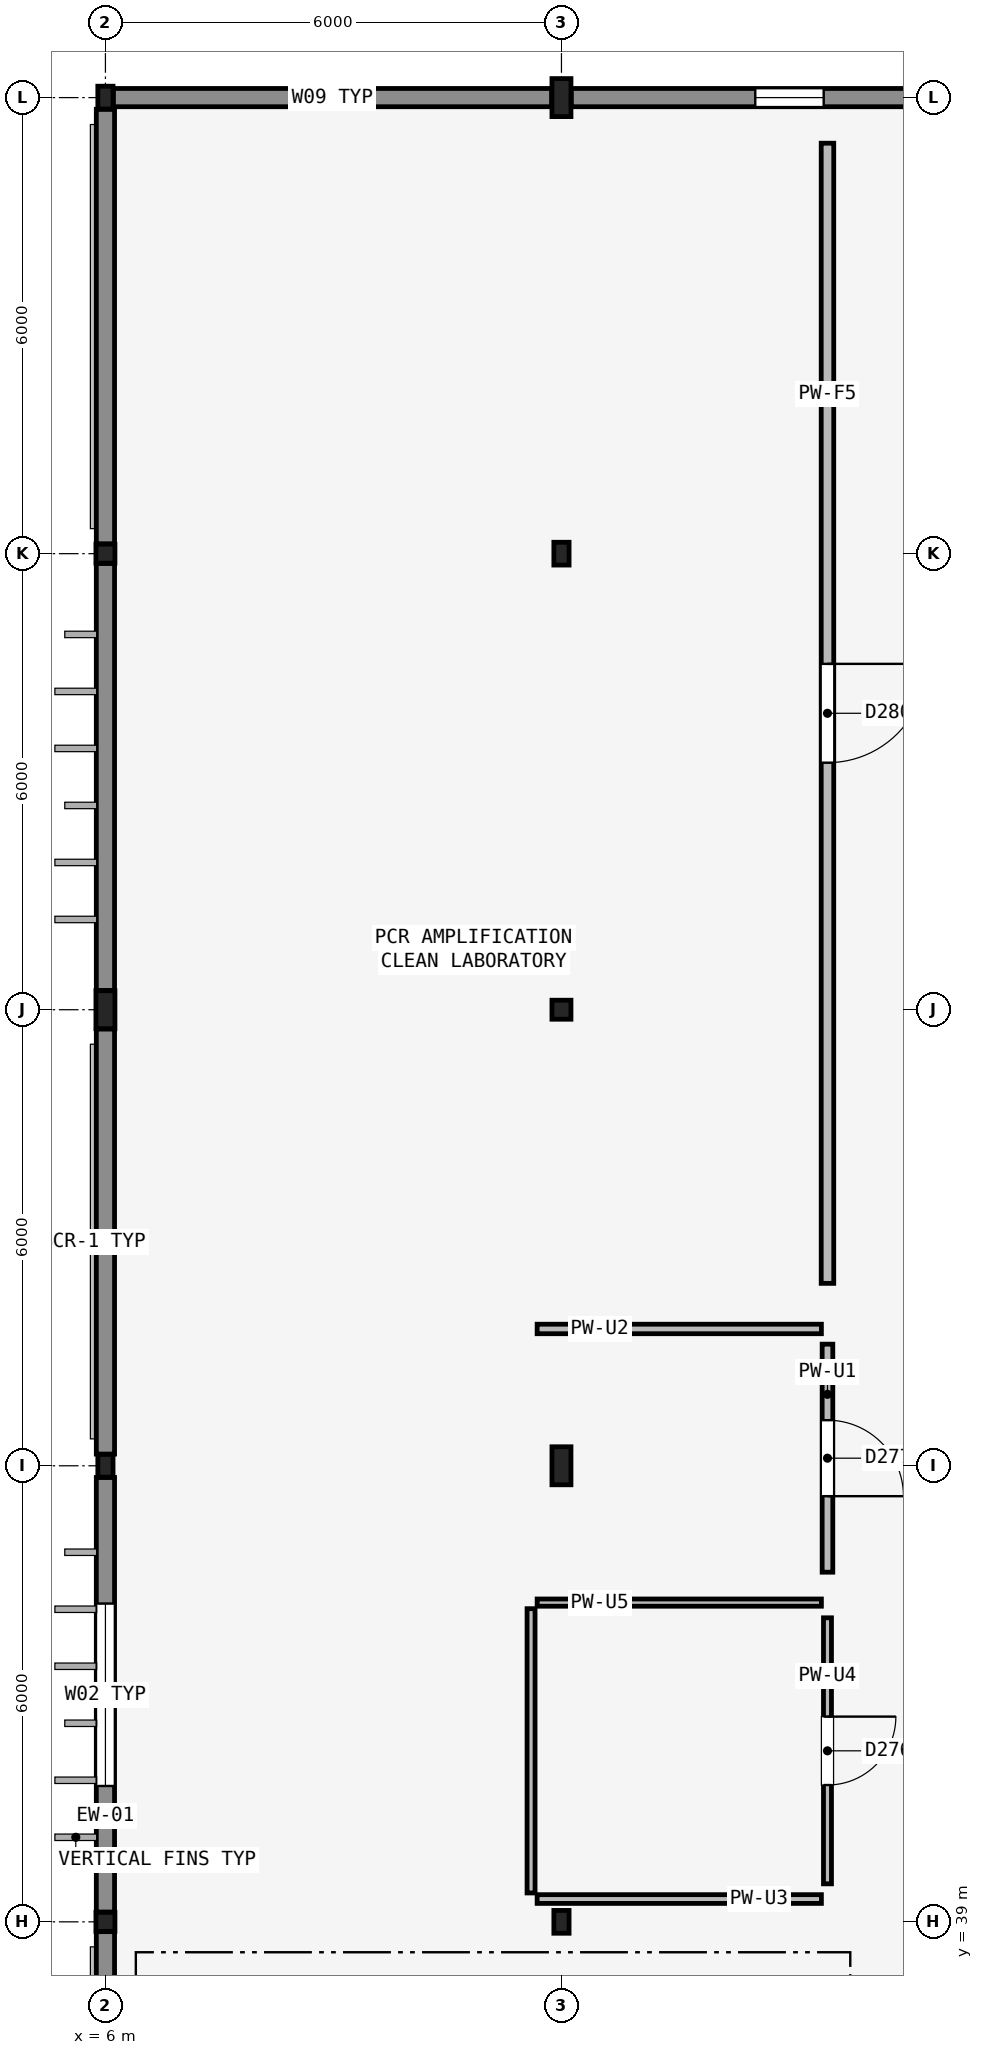
"""IFC4 building model, lengths in metres.
Left out: names, types, materials, properties, quantities, classifications, styles, units other than length and angle.
Written with IfcOpenShell. Run it as: python <this file> out.ifc"""

import sys

from ifc_helpers import new_model, si_unit, direction, frame, frame_2d, origin, origin_2d, place, context, subcontext, project, spatial, rectangle, hollow_rectangle, i_section, extrude, element, fill, save


model = new_model("IFC4")
c1 = context("Model", 3, precision=1e-05, world=origin(), true_north=direction((0.0, 1.0)))
c2 = subcontext(c1, "Body", "Model", "MODEL_VIEW")
j1 = project(units=[si_unit("LENGTHUNIT", "METRE"), si_unit("PLANEANGLEUNIT", "RADIAN")], contexts=[c1])
p1 = place(None, origin())
s1 = spatial("IfcSite", under=j1, at=p1, CompositionType="ELEMENT")
p2 = place(p1, origin())
s2 = spatial("IfcBuilding", under=s1, at=p2, CompositionType="ELEMENT")
p3 = place(p2, frame((0.0, 0.0, 22.2)))
s3 = spatial("IfcBuildingStorey", under=s2, at=p3, CompositionType="ELEMENT", Elevation=22.2)
p4 = place(p3, frame((6.0, 39.0, 0.0), z_axis=(0.0, 0.0, 1.0), x_axis=(1.0, 0.0, 0.0)))
e1 = element("IfcColumn", 1, at=p4, inside=s3, PredefinedType="COLUMN", context=c2, shape_type="SweptSolid", body=[
    extrude(hollow_rectangle(XDim=0.25, YDim=0.25, WallThickness=0.012, InnerFilletRadius=0.012, OuterFilletRadius=0.024, at=origin_2d()), origin(), (0.0, 0.0, 1.0), 3.9),
])
p5 = place(p3, frame((6.0, 45.0, 0.0), z_axis=(0.0, 0.0, 1.0), x_axis=(1.0, 0.0, 0.0)))
e2 = element("IfcColumn", 2, at=p5, inside=s3, PredefinedType="COLUMN", context=c2, shape_type="SweptSolid", body=[
    extrude(hollow_rectangle(XDim=0.2, YDim=0.3, WallThickness=0.012, InnerFilletRadius=0.012, OuterFilletRadius=0.024, at=origin_2d()), origin(), (0.0, 0.0, 1.0), 3.9),
])
p6 = place(p3, frame((6.0, 51.0, 0.0), z_axis=(0.0, 0.0, 1.0), x_axis=(1.0, 0.0, 0.0)))
e3 = element("IfcColumn", 3, at=p6, inside=s3, PredefinedType="COLUMN", context=c2, shape_type="SweptSolid", body=[
    extrude(i_section(OverallWidth=0.25, OverallDepth=0.5, WebThickness=0.01, FlangeThickness=0.015, FilletRadius=0.015, at=origin_2d()), origin(), (0.0, 0.0, 1.0), 3.9),
])
p7 = place(p3, frame((6.0, 57.0, 0.0), z_axis=(0.0, 0.0, 1.0), x_axis=(1.0, 0.0, 0.0)))
e4 = element("IfcColumn", 4, at=p7, inside=s3, PredefinedType="COLUMN", context=c2, shape_type="SweptSolid", body=[
    extrude(hollow_rectangle(XDim=0.25, YDim=0.25, WallThickness=0.012, InnerFilletRadius=0.012, OuterFilletRadius=0.024, at=origin_2d()), origin(), (0.0, 0.0, 1.0), 3.9),
])
for number, where, z_axis, x_axis in (
    (5, (6.0, 63.0, 0.0), (0.0, 0.0, 1.0), (1.0, 0.0, 0.0)),
    (6, (12.0, 39.0, 0.0), (0.0, 0.0, 1.0), (1.0, 0.0, 0.0)),
):
    element("IfcColumn", number, at=place(p3, frame(where, z_axis=z_axis, x_axis=x_axis)), inside=s3, PredefinedType="COLUMN", context=c2, shape_type="SweptSolid", body=[
        extrude(hollow_rectangle(XDim=0.2, YDim=0.3, WallThickness=0.012, InnerFilletRadius=0.012, OuterFilletRadius=0.024, at=origin_2d()), origin(), (0.0, 0.0, 1.0), 3.9),
    ])
p8 = place(p3, frame((12.0, 45.0, 0.0), z_axis=(0.0, 0.0, 1.0), x_axis=(1.0, 0.0, 0.0)))
e7 = element("IfcColumn", 7, at=p8, inside=s3, PredefinedType="COLUMN", context=c2, shape_type="SweptSolid", body=[
    extrude(i_section(OverallWidth=0.25, OverallDepth=0.5, WebThickness=0.01, FlangeThickness=0.015, FilletRadius=0.015, at=origin_2d()), origin(), (0.0, 0.0, 1.0), 3.9),
])
p9 = place(p3, frame((12.0, 51.0, 0.0), z_axis=(0.0, 0.0, 1.0), x_axis=(1.0, 0.0, 0.0)))
e8 = element("IfcColumn", 8, at=p9, inside=s3, PredefinedType="COLUMN", context=c2, shape_type="SweptSolid", body=[
    extrude(hollow_rectangle(XDim=0.25, YDim=0.25, WallThickness=0.012, InnerFilletRadius=0.012, OuterFilletRadius=0.024, at=origin_2d()), origin(), (0.0, 0.0, 1.0), 3.9),
])
p10 = place(p3, frame((12.0, 57.0, 0.0), z_axis=(0.0, 0.0, 1.0), x_axis=(1.0, 0.0, 0.0)))
e9 = element("IfcColumn", 9, at=p10, inside=s3, PredefinedType="COLUMN", context=c2, shape_type="SweptSolid", body=[
    extrude(hollow_rectangle(XDim=0.2, YDim=0.3, WallThickness=0.012, InnerFilletRadius=0.012, OuterFilletRadius=0.024, at=origin_2d()), origin(), (0.0, 0.0, 1.0), 3.9),
])
p11 = place(p3, frame((12.0, 63.0, 0.0), z_axis=(0.0, 0.0, 1.0), x_axis=(1.0, 0.0, 0.0)))
e10 = element("IfcColumn", 10, at=p11, inside=s3, PredefinedType="COLUMN", context=c2, shape_type="SweptSolid", body=[
    extrude(i_section(OverallWidth=0.25, OverallDepth=0.5, WebThickness=0.01, FlangeThickness=0.015, FilletRadius=0.015, at=origin_2d()), origin(), (0.0, 0.0, 1.0), 3.9),
])
p12 = place(p3, frame((6.0, 33.254, 0.0), z_axis=(0.0, 0.0, 1.0), x_axis=(0.0, 1.0, 0.0)))
e11 = element("IfcWall", 11, at=p12, inside=s3, PredefinedType="SOLIDWALL", context=c2, shape_type="SweptSolid", body=[
    extrude(rectangle(XDim=5.617, YDim=0.24, at=frame_2d((2.809, 0.0))), origin(), (0.0, 0.0, 1.0), 3.23),
])
p13 = place(p3, frame((6.0, 39.129, 0.0), z_axis=(0.0, 0.0, 1.0), x_axis=(0.0, 1.0, 0.0)))
e12 = element("IfcWall", 12, at=p13, inside=s3, PredefinedType="SOLIDWALL", context=c2, shape_type="SweptSolid", body=[
    extrude(rectangle(XDim=5.717, YDim=0.24, at=frame_2d((2.858, 0.0))), origin(), (0.0, 0.0, 1.0), 3.18),
])
p14 = place(p13, frame((1.658, 0.0, 0.9)))
e13 = element("IfcOpeningElement", 13, at=p14, cuts=e12, PredefinedType="OPENING", context=c2, shape_type="SweptSolid", body=[
    extrude(rectangle(XDim=2.4, YDim=1.5, at=frame_2d((1.2, 0.75))), frame((0.0, 0.13, 0.0), z_axis=(0.0, -1.0, 0.0), x_axis=(1.0, 0.0, 0.0)), (0.0, 0.0, 1.0), 0.26),
])
p15 = place(p3, frame((6.0, 45.154, 0.0), z_axis=(0.0, 0.0, 1.0), x_axis=(0.0, 1.0, 0.0)))
e14 = element("IfcWall", 14, at=p15, inside=s3, PredefinedType="SOLIDWALL", context=c2, shape_type="SweptSolid", body=[
    extrude(rectangle(XDim=5.592, YDim=0.24, at=frame_2d((2.796, 0.0))), origin(), (0.0, 0.0, 1.0), 3.18),
])
p16 = place(p3, frame((6.0, 51.254, 0.0), z_axis=(0.0, 0.0, 1.0), x_axis=(0.0, 1.0, 0.0)))
e15 = element("IfcWall", 15, at=p16, inside=s3, PredefinedType="SOLIDWALL", context=c2, shape_type="SweptSolid", body=[
    extrude(rectangle(XDim=5.617, YDim=0.24, at=frame_2d((2.809, 0.0))), origin(), (0.0, 0.0, 1.0), 3.18),
])
p17 = place(p3, frame((6.0, 57.129, 0.0), z_axis=(0.0, 0.0, 1.0), x_axis=(0.0, 1.0, 0.0)))
e16 = element("IfcWall", 16, at=p17, inside=s3, PredefinedType="SOLIDWALL", context=c2, shape_type="SweptSolid", body=[
    extrude(rectangle(XDim=5.717, YDim=0.24, at=frame_2d((2.858, 0.0))), origin(), (0.0, 0.0, 1.0), 3.18),
])
p18 = place(p3, frame((6.104, 63.0, 0.0), z_axis=(0.0, 0.0, 1.0), x_axis=(1.0, 0.0, 0.0)))
e17 = element("IfcWall", 17, at=p18, inside=s3, PredefinedType="SOLIDWALL", context=c2, shape_type="SweptSolid", body=[
    extrude(rectangle(XDim=5.767, YDim=0.24, at=frame_2d((2.884, 0.0))), origin(), (0.0, 0.0, 1.0), 3.08),
])
p19 = place(p18, frame((2.434, 0.0, 1.0)))
e18 = element("IfcOpeningElement", 18, at=p19, cuts=e17, PredefinedType="OPENING", context=c2, shape_type="SweptSolid", body=[
    extrude(rectangle(XDim=0.9, YDim=1.5, at=frame_2d((0.45, 0.75))), frame((0.0, 0.13, 0.0), z_axis=(0.0, -1.0, 0.0), x_axis=(1.0, 0.0, 0.0)), (0.0, 0.0, 1.0), 0.26),
])
p20 = place(p3, frame((12.129, 63.0, 0.0), z_axis=(0.0, 0.0, 1.0), x_axis=(1.0, 0.0, 0.0)))
e19 = element("IfcWall", 19, at=p20, inside=s3, PredefinedType="SOLIDWALL", context=c2, shape_type="SweptSolid", body=[
    extrude(rectangle(XDim=5.742, YDim=0.24, at=frame_2d((2.871, 0.0))), origin(), (0.0, 0.0, 1.0), 3.08),
])
p21 = place(p20, frame((2.421, 0.0, 1.0)))
e20 = element("IfcOpeningElement", 20, at=p21, cuts=e19, PredefinedType="OPENING", context=c2, shape_type="SweptSolid", body=[
    extrude(rectangle(XDim=0.9, YDim=1.5, at=frame_2d((0.45, 0.75))), frame((0.0, 0.13, 0.0), z_axis=(0.0, -1.0, 0.0), x_axis=(1.0, 0.0, 0.0)), (0.0, 0.0, 1.0), 0.26),
])
p22 = place(p3, frame((15.5, 43.0, 0.0), z_axis=(0.0, 0.0, 1.0), x_axis=(0.0, -1.0, 0.0)))
e21 = element("IfcWall", 21, at=p22, inside=s3, PredefinedType="PARTITIONING", context=c2, shape_type="SweptSolid", body=[
    extrude(rectangle(XDim=3.5, YDim=0.105, at=frame_2d((1.75, 0.0))), origin(), (0.0, 0.0, 1.0), 3.68),
])
p23 = place(p22, frame((1.3, 0.0, 0.0)))
e22 = element("IfcOpeningElement", 22, at=p23, cuts=e21, PredefinedType="OPENING", context=c2, shape_type="SweptSolid", body=[
    extrude(rectangle(XDim=0.9, YDim=2.1, at=frame_2d((0.45, 1.05))), frame((0.0, 0.062, 0.0), z_axis=(0.0, -1.0, 0.0), x_axis=(1.0, 0.0, 0.0)), (0.0, 0.0, 1.0), 0.125),
])
p24 = place(p3, frame((15.5, 46.6, 0.0), z_axis=(0.0, 0.0, 1.0), x_axis=(0.0, -1.0, 0.0)))
e23 = element("IfcWall", 23, at=p24, inside=s3, PredefinedType="PARTITIONING", context=c2, shape_type="SweptSolid", body=[
    extrude(rectangle(XDim=3.0, YDim=0.14, at=frame_2d((1.5, 0.0))), origin(), (0.0, 0.0, 1.0), 3.08),
])
p25 = place(p24, frame((1.0, 0.0, 0.0)))
e24 = element("IfcOpeningElement", 24, at=p25, cuts=e23, PredefinedType="OPENING", context=c2, shape_type="SweptSolid", body=[
    extrude(rectangle(XDim=1.0, YDim=2.1, at=frame_2d((0.5, 1.05))), frame((0.0, 0.08, 0.0), z_axis=(0.0, -1.0, 0.0), x_axis=(1.0, 0.0, 0.0)), (0.0, 0.0, 1.0), 0.16),
])
p26 = place(p3, frame((15.5, 62.4, 0.0), z_axis=(0.0, 0.0, 1.0), x_axis=(0.0, -1.0, 0.0)))
e25 = element("IfcWall", 25, at=p26, inside=s3, PredefinedType="PARTITIONING", context=c2, shape_type="SweptSolid", body=[
    extrude(rectangle(XDim=15.0, YDim=0.165, at=frame_2d((7.5, 0.0))), origin(), (0.0, 0.0, 1.0), 3.08),
])
p27 = place(p26, frame((6.85, 0.0, 0.0)))
e26 = element("IfcOpeningElement", 26, at=p27, cuts=e25, PredefinedType="OPENING", context=c2, shape_type="SweptSolid", body=[
    extrude(rectangle(XDim=1.3, YDim=2.2, at=frame_2d((0.65, 1.1))), frame((0.0, 0.093, 0.0), z_axis=(0.0, -1.0, 0.0), x_axis=(1.0, 0.0, 0.0)), (0.0, 0.0, 1.0), 0.185),
])
p28 = place(p3, frame((15.42, 39.3, 0.0), z_axis=(0.0, 0.0, 1.0), x_axis=(-1.0, 0.0, 0.0)))
e27 = element("IfcWall", 27, at=p28, inside=s3, PredefinedType="PARTITIONING", context=c2, shape_type="SweptSolid", body=[
    extrude(rectangle(XDim=3.74, YDim=0.115, at=frame_2d((1.87, 0.0))), origin(), (0.0, 0.0, 1.0), 3.28),
])
p29 = place(p3, frame((11.6, 39.38, 0.0), z_axis=(0.0, 0.0, 1.0), x_axis=(0.0, 1.0, 0.0)))
e28 = element("IfcWall", 28, at=p29, inside=s3, PredefinedType="PARTITIONING", context=c2, shape_type="SweptSolid", body=[
    extrude(rectangle(XDim=3.74, YDim=0.105, at=frame_2d((1.87, 0.0))), origin(), (0.0, 0.0, 1.0), 3.68),
])
p30 = place(p3, frame((11.68, 43.2, 0.0), z_axis=(0.0, 0.0, 1.0), x_axis=(1.0, 0.0, 0.0)))
e29 = element("IfcWall", 29, at=p30, inside=s3, PredefinedType="PARTITIONING", context=c2, shape_type="SweptSolid", body=[
    extrude(rectangle(XDim=3.74, YDim=0.095, at=frame_2d((1.87, 0.0))), origin(), (0.0, 0.0, 1.0), 3.28),
])
p31 = place(p3, frame((11.68, 46.8, 0.0), z_axis=(0.0, 0.0, 1.0), x_axis=(1.0, 0.0, 0.0)))
e30 = element("IfcWall", 30, at=p31, inside=s3, PredefinedType="PARTITIONING", context=c2, shape_type="SweptSolid", body=[
    extrude(rectangle(XDim=3.74, YDim=0.125, at=frame_2d((1.87, 0.0))), origin(), (0.0, 0.0, 1.0), 3.274),
])
p32 = place(p14, origin())
e31 = element("IfcWindow", 31, at=p32, inside=s3, PartitioningType="SINGLE_PANEL", PredefinedType="WINDOW", context=c2, shape_type="SweptSolid", body=[
    extrude(rectangle(XDim=2.4, YDim=1.5, at=frame_2d((1.2, 0.75))), frame((0.0, 0.03, 0.0), z_axis=(0.0, -1.0, 0.0), x_axis=(1.0, 0.0, 0.0)), (0.0, 0.0, 1.0), 0.06),
])
fill(e13, e31)
p33 = place(p19, origin())
e32 = element("IfcWindow", 32, at=p33, inside=s3, PartitioningType="SINGLE_PANEL", PredefinedType="WINDOW", context=c2, shape_type="SweptSolid", body=[
    extrude(rectangle(XDim=0.9, YDim=1.5, at=frame_2d((0.45, 0.75))), frame((0.0, 0.03, 0.0), z_axis=(0.0, -1.0, 0.0), x_axis=(1.0, 0.0, 0.0)), (0.0, 0.0, 1.0), 0.06),
])
fill(e18, e32)
p34 = place(p21, origin())
e33 = element("IfcWindow", 33, at=p34, inside=s3, PartitioningType="SINGLE_PANEL", PredefinedType="WINDOW", context=c2, shape_type="SweptSolid", body=[
    extrude(rectangle(XDim=0.9, YDim=1.5, at=frame_2d((0.45, 0.75))), frame((0.0, 0.03, 0.0), z_axis=(0.0, -1.0, 0.0), x_axis=(1.0, 0.0, 0.0)), (0.0, 0.0, 1.0), 0.06),
])
fill(e20, e33)
p35 = place(p23, origin())
e34 = element("IfcDoor", 34, at=p35, inside=s3, OperationType="SINGLE_SWING_LEFT", PredefinedType="DOOR", context=c2, shape_type="SweptSolid", body=[
    extrude(rectangle(XDim=0.9, YDim=2.1, at=frame_2d((0.45, 1.05))), frame((0.0, 0.025, 0.0), z_axis=(0.0, -1.0, 0.0), x_axis=(1.0, 0.0, 0.0)), (0.0, 0.0, 1.0), 0.05),
])
fill(e22, e34)
p36 = place(p25, origin())
e35 = element("IfcDoor", 35, at=p36, inside=s3, OperationType="SINGLE_SWING_RIGHT", PredefinedType="DOOR", context=c2, shape_type="SweptSolid", body=[
    extrude(rectangle(XDim=1.0, YDim=2.1, at=frame_2d((0.5, 1.05))), frame((0.0, 0.025, 0.0), z_axis=(0.0, -1.0, 0.0), x_axis=(1.0, 0.0, 0.0)), (0.0, 0.0, 1.0), 0.05),
])
fill(e24, e35)
p37 = place(p27, origin())
e36 = element("IfcDoor", 36, at=p37, inside=s3, OperationType="SINGLE_SWING_LEFT", PredefinedType="DOOR", context=c2, shape_type="SweptSolid", body=[
    extrude(rectangle(XDim=1.3, YDim=2.2, at=frame_2d((0.65, 1.1))), frame((0.0, 0.025, 0.0), z_axis=(0.0, -1.0, 0.0), x_axis=(1.0, 0.0, 0.0)), (0.0, 0.0, 1.0), 0.05),
])
fill(e26, e36)
save(model, sys.argv[1])
